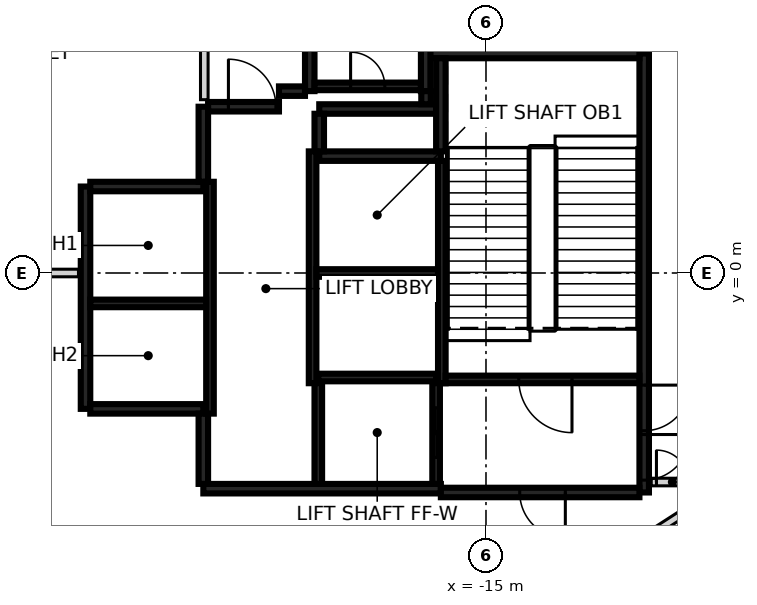
"""IFC4 building model, lengths in metres.
Left out: names, types, materials, properties, quantities, classifications, styles, units other than length and angle.
Written with IfcOpenShell. Run it as: python <this file> out.ifc"""

import sys

from ifc_helpers import new_model, si_unit, direction, frame, frame_2d, origin, place, context, subcontext, project, spatial, rectangle, extrude, element, fill, save


model = new_model("IFC4")
c1 = context("Model", 3, precision=1e-05, world=origin(), true_north=direction((0.0, 1.0)))
c2 = subcontext(c1, "Body", "Model", "MODEL_VIEW")
j1 = project(units=[si_unit("LENGTHUNIT", "METRE"), si_unit("PLANEANGLEUNIT", "RADIAN")], contexts=[c1])
p1 = place(None, origin())
s1 = spatial("IfcSite", under=j1, at=p1, CompositionType="ELEMENT")
p2 = place(p1, origin())
s2 = spatial("IfcBuilding", under=s1, at=p2, CompositionType="ELEMENT")
p3 = place(p2, frame((0.0, 0.0, 24.5)))
s3 = spatial("IfcBuildingStorey", under=s2, at=p3, CompositionType="ELEMENT", Elevation=24.5)
p4 = place(p3, frame((-10.837, 5.775, 0.0), z_axis=(0.0, 0.0, 1.0), x_axis=(0.0, -1.0, 0.0)))
e1 = element("IfcWall", 1, at=p4, inside=s3, PredefinedType="SHEAR", context=c2, shape_type="SweptSolid", body=[
    extrude(rectangle(XDim=11.55, YDim=0.25, at=frame_2d((5.775, 0.0))), origin(), (0.0, 0.0, 1.0), 4.6),
])
p5 = place(p4, frame((10.025, 0.0, 0.0)))
e2 = element("IfcOpeningElement", 2, at=p5, cuts=e1, PredefinedType="OPENING", context=c2, shape_type="SweptSolid", body=[
    extrude(rectangle(XDim=1.2, YDim=2.1, at=frame_2d((0.6, 1.05))), frame((0.0, 0.135, 0.0), z_axis=(0.0, -1.0, 0.0), x_axis=(1.0, 0.0, 0.0)), (0.0, 0.0, 1.0), 0.27),
])
p6 = place(p4, frame((8.725, 0.0, 0.0)))
e3 = element("IfcOpeningElement", 3, at=p6, cuts=e1, PredefinedType="OPENING", context=c2, shape_type="SweptSolid", body=[
    extrude(rectangle(XDim=1.2, YDim=2.1, at=frame_2d((0.6, 1.05))), frame((0.0, 0.135, 0.0), z_axis=(0.0, -1.0, 0.0), x_axis=(1.0, 0.0, 0.0)), (0.0, 0.0, 1.0), 0.27),
])
p7 = place(p3, frame((-16.187, -5.675, 0.0), z_axis=(0.0, 0.0, 1.0), x_axis=(-1.0, 0.0, 0.0)))
e4 = element("IfcWall", 4, at=p7, inside=s3, PredefinedType="SHEAR", context=c2, shape_type="SweptSolid", body=[
    extrude(rectangle(XDim=6.25, YDim=0.25, at=frame_2d((3.125, 0.0))), origin(), (0.0, 0.0, 1.0), 4.6),
])
p8 = place(p3, frame((-25.537, -3.575, 0.0), z_axis=(0.0, 0.0, 1.0), x_axis=(0.0, 1.0, 0.0)))
e5 = element("IfcWall", 5, at=p8, inside=s3, PredefinedType="SHEAR", context=c2, shape_type="SweptSolid", body=[
    extrude(rectangle(XDim=5.85, YDim=0.25, at=frame_2d((2.925, 0.0))), origin(), (0.0, 0.0, 1.0), 4.6),
])
p9 = place(p3, frame((-10.963, -5.775, 0.0), z_axis=(0.0, 0.0, 1.0), x_axis=(-1.0, 0.0, 0.0)))
e6 = element("IfcWall", 6, at=p9, inside=s3, PredefinedType="SHEAR", context=c2, shape_type="SweptSolid", body=[
    extrude(rectangle(XDim=5.225, YDim=0.25, at=frame_2d((2.612, 0.0))), origin(), (0.0, 0.0, 1.0), 4.6),
])
p10 = place(p9, frame((1.95, 0.0, 0.0)))
e7 = element("IfcOpeningElement", 7, at=p10, cuts=e6, PredefinedType="OPENING", context=c2, shape_type="SweptSolid", body=[
    extrude(rectangle(XDim=1.2, YDim=2.1, at=frame_2d((0.6, 1.05))), frame((0.0, 0.135, 0.0), z_axis=(0.0, -1.0, 0.0), x_axis=(1.0, 0.0, 0.0)), (0.0, 0.0, 1.0), 0.27),
])
p11 = place(p3, frame((-16.472, 5.775, 0.0), z_axis=(0.0, 0.0, 1.0), x_axis=(1.0, 0.0, 0.0)))
e8 = element("IfcWall", 8, at=p11, inside=s3, PredefinedType="SHEAR", context=c2, shape_type="SweptSolid", body=[
    extrude(rectangle(XDim=5.51, YDim=0.25, at=frame_2d((2.755, 0.0))), origin(), (0.0, 0.0, 1.0), 4.6),
])
p12 = place(p3, frame((-19.387, 3.075, 0.0), z_axis=(0.0, 0.0, 1.0), x_axis=(1.0, 0.0, 0.0)))
e9 = element("IfcWall", 9, at=p12, inside=s3, PredefinedType="SHEAR", context=c2, shape_type="SweptSolid", body=[
    extrude(rectangle(XDim=3.2, YDim=0.25, at=frame_2d((1.6, 0.0))), origin(), (0.0, 0.0, 1.0), 4.6),
])
for number, where, z_axis, x_axis in (
    (10, (-22.437, -3.575, 0.0), (0.0, 0.0, 1.0), (-1.0, 0.0, 0.0)),
    (11, (-25.412, 2.275, 0.0), (0.0, 0.0, 1.0), (1.0, 0.0, 0.0)),
):
    element("IfcWall", number, at=place(p3, frame(where, z_axis=z_axis, x_axis=x_axis)), inside=s3, PredefinedType="SHEAR", context=c2, shape_type="SweptSolid", body=[
        extrude(rectangle(XDim=2.975, YDim=0.25, at=frame_2d((1.487, 0.0))), origin(), (0.0, 0.0, 1.0), 4.6),
    ])
for number, where, z_axis, x_axis in (
    (12, (-16.587, 7.65, 0.0), (0.0, 0.0, 1.0), (0.0, -1.0, 0.0)),
    (13, (-19.637, 4.785, 0.0), (0.0, 0.0, 1.0), (0.0, 1.0, 0.0)),
):
    element("IfcWall", number, at=place(p3, frame(where, z_axis=z_axis, x_axis=x_axis)), inside=s3, PredefinedType="SHEAR", context=c2, shape_type="SweptSolid", body=[
        extrude(rectangle(XDim=2.865, YDim=0.25, at=frame_2d((1.432, 0.0))), origin(), (0.0, 0.0, 1.0), 4.6),
    ])
p13 = place(p3, frame((-16.302, 4.315, 0.0), z_axis=(0.0, 0.0, 1.0), x_axis=(-1.0, 0.0, 0.0)))
e14 = element("IfcWall", 14, at=p13, inside=s3, PredefinedType="SHEAR", context=c2, shape_type="SweptSolid", body=[
    extrude(rectangle(XDim=3.085, YDim=0.25, at=frame_2d((1.542, 0.0))), origin(), (0.0, 0.0, 1.0), 4.6),
])
p14 = place(p3, frame((-16.187, 3.2, 0.0), z_axis=(0.0, 0.0, 1.0), x_axis=(0.0, 1.0, 0.0)))
e15 = element("IfcWall", 15, at=p14, inside=s3, PredefinedType="SHEAR", context=c2, shape_type="SweptSolid", body=[
    extrude(rectangle(XDim=2.449, YDim=0.25, at=frame_2d((1.225, 0.0))), origin(), (0.0, 0.0, 1.0), 4.6),
])
p15 = place(p3, frame((-22.437, 2.4, 0.0), z_axis=(0.0, 0.0, 1.0), x_axis=(0.0, 1.0, 0.0)))
e16 = element("IfcWall", 16, at=p15, inside=s3, PredefinedType="SHEAR", context=c2, shape_type="SweptSolid", body=[
    extrude(rectangle(XDim=1.975, YDim=0.25, at=frame_2d((0.987, 0.0))), origin(), (0.0, 0.0, 1.0), 4.6),
])
p16 = place(p3, frame((-22.437, -5.55, 0.0), z_axis=(0.0, 0.0, 1.0), x_axis=(0.0, 1.0, 0.0)))
e17 = element("IfcWall", 17, at=p16, inside=s3, PredefinedType="SHEAR", context=c2, shape_type="SweptSolid", body=[
    extrude(rectangle(XDim=1.849, YDim=0.25, at=frame_2d((0.925, 0.0))), origin(), (0.0, 0.0, 1.0), 4.6),
])
p17 = place(p3, frame((-22.312, 4.375, 0.0), z_axis=(0.0, 0.0, 1.0), x_axis=(1.0, 0.0, 0.0)))
e18 = element("IfcWall", 18, at=p17, inside=s3, PredefinedType="SHEAR", context=c2, shape_type="SweptSolid", body=[
    extrude(rectangle(XDim=1.865, YDim=0.25, at=frame_2d((0.932, 0.0))), origin(), (0.0, 0.0, 1.0), 4.6),
])
p18 = place(p17, frame((0.535, 0.0, 0.0)))
e19 = element("IfcOpeningElement", 19, at=p18, cuts=e18, PredefinedType="OPENING", context=c2, shape_type="SweptSolid", body=[
    extrude(rectangle(XDim=1.25, YDim=2.1, at=frame_2d((0.625, 1.05))), frame((0.0, 0.135, 0.0), z_axis=(0.0, -1.0, 0.0), x_axis=(1.0, 0.0, 0.0)), (0.0, 0.0, 1.0), 0.27),
])
p19 = place(p3, frame((-19.387, 4.19, 0.0), z_axis=(0.0, 0.0, 1.0), x_axis=(0.0, -1.0, 0.0)))
e20 = element("IfcWall", 20, at=p19, inside=s3, PredefinedType="SHEAR", context=c2, shape_type="SweptSolid", body=[
    extrude(rectangle(XDim=0.989, YDim=0.25, at=frame_2d((0.495, 0.0))), origin(), (0.0, 0.0, 1.0), 4.6),
])
p20 = place(p3, frame((-20.447, 4.785, 0.0), z_axis=(0.0, 0.0, 1.0), x_axis=(1.0, 0.0, 0.0)))
e21 = element("IfcWall", 21, at=p20, inside=s3, PredefinedType="SHEAR", context=c2, shape_type="SweptSolid", body=[
    extrude(rectangle(XDim=0.685, YDim=0.25, at=frame_2d((0.342, 0.0))), origin(), (0.0, 0.0, 1.0), 4.6),
])
p21 = place(p3, frame((-16.577, 4.785, 0.0), z_axis=(0.0, 0.0, 1.0), x_axis=(0.0, -1.0, 0.0)))
e22 = element("IfcWall", 22, at=p21, inside=s3, PredefinedType="SHEAR", context=c2, shape_type="SweptSolid", body=[
    extrude(rectangle(XDim=0.344, YDim=0.25, at=frame_2d((0.172, 0.0))), origin(), (0.0, 0.0, 1.0), 4.6),
])
p22 = place(p3, frame((-16.162, 2.951, 0.0), z_axis=(0.0, 0.0, 1.0), x_axis=(0.0, -1.0, 0.0)))
e23 = element("IfcWall", 23, at=p22, inside=s3, PredefinedType="SHEAR", context=c2, shape_type="SweptSolid", body=[
    extrude(rectangle(XDim=5.851, YDim=0.2, at=frame_2d((2.925, 0.0))), origin(), (0.0, 0.0, 1.0), 4.6),
])
for number, where, z_axis, x_axis in (
    (24, (-19.562, -2.9, 0.0), (0.0, 0.0, 1.0), (0.0, 1.0, 0.0)),
    (25, (-22.262, 2.4, 0.0), (0.0, 0.0, 1.0), (0.0, -1.0, 0.0)),
):
    element("IfcWall", number, at=place(p3, frame(where, z_axis=z_axis, x_axis=x_axis)), inside=s3, PredefinedType="SHEAR", context=c2, shape_type="SweptSolid", body=[
        extrude(rectangle(XDim=6.1, YDim=0.2, at=frame_2d((3.05, 0.0))), origin(), (0.0, 0.0, 1.0), 4.6),
    ])
p23 = place(p3, frame((-10.963, -2.8, 0.0), z_axis=(0.0, 0.0, 1.0), x_axis=(-1.0, 0.0, 0.0)))
e26 = element("IfcWall", 26, at=p23, inside=s3, PredefinedType="SHEAR", context=c2, shape_type="SweptSolid", body=[
    extrude(rectangle(XDim=5.098, YDim=0.2, at=frame_2d((2.549, 0.0))), origin(), (0.0, 0.0, 1.0), 4.6),
])
p24 = place(p23, frame((1.774, 0.0, 0.0)))
e27 = element("IfcOpeningElement", 27, at=p24, cuts=e26, PredefinedType="OPENING", context=c2, shape_type="SweptSolid", body=[
    extrude(rectangle(XDim=1.4, YDim=2.1, at=frame_2d((0.7, 1.05))), frame((0.0, 0.11, 0.0), z_axis=(0.0, -1.0, 0.0), x_axis=(1.0, 0.0, 0.0)), (0.0, 0.0, 1.0), 0.22),
])
p25 = place(p3, frame((-16.263, 0.0, 0.0), z_axis=(0.0, 0.0, 1.0), x_axis=(-1.0, 0.0, 0.0)))
e28 = element("IfcWall", 28, at=p25, inside=s3, PredefinedType="SHEAR", context=c2, shape_type="SweptSolid", body=[
    extrude(rectangle(XDim=3.198, YDim=0.2, at=frame_2d((1.599, 0.0))), origin(), (0.0, 0.0, 1.0), 4.6),
])
p26 = place(p3, frame((-22.363, -0.8, 0.0), z_axis=(0.0, 0.0, 1.0), x_axis=(-1.0, 0.0, 0.0)))
e29 = element("IfcWall", 29, at=p26, inside=s3, PredefinedType="SHEAR", context=c2, shape_type="SweptSolid", body=[
    extrude(rectangle(XDim=3.048, YDim=0.2, at=frame_2d((1.524, 0.0))), origin(), (0.0, 0.0, 1.0), 4.6),
])
p27 = place(p3, frame((-19.511, 4.91, 0.0), z_axis=(0.0, 0.0, 1.0), x_axis=(1.0, 0.0, 0.0)))
e30 = element("IfcWall", 30, at=p27, inside=s3, PredefinedType="SHEAR", context=c2, shape_type="SweptSolid", body=[
    extrude(rectangle(XDim=2.798, YDim=0.2, at=frame_2d((1.399, 0.0))), origin(), (0.0, 0.0, 1.0), 4.6),
])
p28 = place(p27, frame((0.949, 0.0, 0.0)))
e31 = element("IfcOpeningElement", 31, at=p28, cuts=e30, PredefinedType="OPENING", context=c2, shape_type="SweptSolid", body=[
    extrude(rectangle(XDim=0.9, YDim=2.1, at=frame_2d((0.45, 1.05))), frame((0.0, 0.11, 0.0), z_axis=(0.0, -1.0, 0.0), x_axis=(1.0, 0.0, 0.0)), (0.0, 0.0, 1.0), 0.22),
])
p29 = place(p3, frame((-19.412, -2.75, 0.0), z_axis=(0.0, 0.0, 1.0), x_axis=(1.0, 0.0, 0.0)))
e32 = element("IfcWall", 32, at=p29, inside=s3, PredefinedType="SHEAR", context=c2, shape_type="SweptSolid", body=[
    extrude(rectangle(XDim=3.1, YDim=0.2, at=frame_2d((1.55, 0.0))), origin(), (0.0, 0.0, 1.0), 4.6),
])
p30 = place(p3, frame((-16.312, -2.898, 0.0), z_axis=(0.0, 0.0, 1.0), x_axis=(0.0, -1.0, 0.0)))
e33 = element("IfcWall", 33, at=p30, inside=s3, PredefinedType="SHEAR", context=c2, shape_type="SweptSolid", body=[
    extrude(rectangle(XDim=2.651, YDim=0.2, at=frame_2d((1.325, 0.0))), origin(), (0.0, 0.0, 1.0), 4.6),
])
p31 = place(p30, frame((0.652, 0.0, 0.0)))
e34 = element("IfcOpeningElement", 34, at=p31, cuts=e33, PredefinedType="OPENING", context=c2, shape_type="SweptSolid", body=[
    extrude(rectangle(XDim=1.3, YDim=2.1, at=frame_2d((0.65, 1.05))), frame((0.0, 0.11, 0.0), z_axis=(0.0, -1.0, 0.0), x_axis=(1.0, 0.0, 0.0)), (0.0, 0.0, 1.0), 0.22),
])
p32 = place(p3, frame((-19.412, -5.549, 0.0), z_axis=(0.0, 0.0, 1.0), x_axis=(0.0, 1.0, 0.0)))
e35 = element("IfcWall", 35, at=p32, inside=s3, PredefinedType="SHEAR", context=c2, shape_type="SweptSolid", body=[
    extrude(rectangle(XDim=2.651, YDim=0.2, at=frame_2d((1.325, 0.0))), origin(), (0.0, 0.0, 1.0), 4.6),
])
p33 = place(p3, frame((-22.412, 4.56, 0.0), z_axis=(0.0, 0.0, 1.0), x_axis=(0.0, 1.0, 0.0)))
e36 = element("IfcWall", 36, at=p33, inside=s3, PredefinedType="PARTITIONING", context=c2, shape_type="SweptSolid", body=[
    extrude(rectangle(XDim=1.39, YDim=0.2, at=frame_2d((0.695, 0.0))), origin(), (0.0, 0.0, 1.0), 4.6),
])
p34 = place(p3, frame((-10.652, -5.5, 0.0), z_axis=(0.0, 0.0, 1.0), x_axis=(1.0, 0.0, 0.0)))
e37 = element("IfcWall", 37, at=p34, inside=s3, PredefinedType="PARTITIONING", context=c2, shape_type="SweptSolid", body=[
    extrude(rectangle(XDim=1.177, YDim=0.2, at=frame_2d((0.589, 0.0))), origin(), (0.0, 0.0, 1.0), 4.6),
])
p35 = place(p34, frame((0.137, 0.0, 0.0)))
e38 = element("IfcOpeningElement", 38, at=p35, cuts=e37, PredefinedType="OPENING", context=c2, shape_type="SweptSolid", body=[
    extrude(rectangle(XDim=0.84, YDim=2.1, at=frame_2d((0.42, 1.05))), frame((0.0, 0.11, 0.0), z_axis=(0.0, -1.0, 0.0), x_axis=(1.0, 0.0, 0.0)), (0.0, 0.0, 1.0), 0.22),
])
p36 = place(p3, frame((-30.75, 0.0, 0.0), z_axis=(0.0, 0.0, 1.0), x_axis=(1.0, 0.0, 0.0)))
e39 = element("IfcWall", 39, at=p36, inside=s3, PredefinedType="PARTITIONING", context=c2, shape_type="SweptSolid", body=[
    extrude(rectangle(XDim=5.028, YDim=0.2, at=frame_2d((2.514, 0.0))), origin(), (0.0, 0.0, 1.0), 4.6),
])
p37 = place(p3, frame((-25.509, -16.444, 0.0), z_axis=(0.0, 0.0, 1.0), x_axis=(0.840502189504, 0.541808148184, 0.0)))
e40 = element("IfcWall", 40, at=p37, inside=s3, PredefinedType="PARTITIONING", context=c2, shape_type="SweptSolid", body=[
    extrude(rectangle(XDim=19.666, YDim=0.2, at=frame_2d((9.833, 0.0))), origin(), (0.0, 0.0, 1.0), 4.6),
])
p38 = place(p31, origin())
e41 = element("IfcDoor", 41, at=p38, inside=s3, OperationType="SLIDING_TO_LEFT", PredefinedType="DOOR", context=c2, shape_type="SweptSolid", body=[
    extrude(rectangle(XDim=1.3, YDim=2.1, at=frame_2d((0.65, 1.05))), frame((0.0, 0.025, 0.0), z_axis=(0.0, -1.0, 0.0), x_axis=(1.0, 0.0, 0.0)), (0.0, 0.0, 1.0), 0.05),
])
fill(e34, e41)
p39 = place(p18, origin())
e42 = element("IfcDoor", 42, at=p39, inside=s3, OperationType="SINGLE_SWING_LEFT", PredefinedType="DOOR", context=c2, shape_type="SweptSolid", body=[
    extrude(rectangle(XDim=1.25, YDim=2.1, at=frame_2d((0.625, 1.05))), frame((0.0, 0.025, 0.0), z_axis=(0.0, -1.0, 0.0), x_axis=(1.0, 0.0, 0.0)), (0.0, 0.0, 1.0), 0.05),
])
fill(e19, e42)
p40 = place(p5, origin())
e43 = element("IfcDoor", 43, at=p40, inside=s3, OperationType="SINGLE_SWING_LEFT", PredefinedType="DOOR", context=c2, shape_type="SweptSolid", body=[
    extrude(rectangle(XDim=1.2, YDim=2.1, at=frame_2d((0.6, 1.05))), frame((0.0, 0.025, 0.0), z_axis=(0.0, -1.0, 0.0), x_axis=(1.0, 0.0, 0.0)), (0.0, 0.0, 1.0), 0.05),
])
fill(e2, e43)
p41 = place(p6, origin())
e44 = element("IfcDoor", 44, at=p41, inside=s3, OperationType="SINGLE_SWING_RIGHT", PredefinedType="DOOR", context=c2, shape_type="SweptSolid", body=[
    extrude(rectangle(XDim=1.2, YDim=2.1, at=frame_2d((0.6, 1.05))), frame((0.0, 0.025, 0.0), z_axis=(0.0, -1.0, 0.0), x_axis=(1.0, 0.0, 0.0)), (0.0, 0.0, 1.0), 0.05),
])
fill(e3, e44)
p42 = place(p24, origin())
e45 = element("IfcDoor", 45, at=p42, inside=s3, OperationType="SINGLE_SWING_LEFT", PredefinedType="DOOR", context=c2, shape_type="SweptSolid", body=[
    extrude(rectangle(XDim=1.4, YDim=2.1, at=frame_2d((0.7, 1.05))), frame((0.0, 0.025, 0.0), z_axis=(0.0, -1.0, 0.0), x_axis=(1.0, 0.0, 0.0)), (0.0, 0.0, 1.0), 0.05),
])
fill(e27, e45)
p43 = place(p28, origin())
e46 = element("IfcDoor", 46, at=p43, inside=s3, OperationType="SINGLE_SWING_RIGHT", PredefinedType="DOOR", context=c2, shape_type="SweptSolid", body=[
    extrude(rectangle(XDim=0.9, YDim=2.1, at=frame_2d((0.45, 1.05))), frame((0.0, 0.025, 0.0), z_axis=(0.0, -1.0, 0.0), x_axis=(1.0, 0.0, 0.0)), (0.0, 0.0, 1.0), 0.05),
])
fill(e31, e46)
p44 = place(p10, origin())
e47 = element("IfcDoor", 47, at=p44, inside=s3, OperationType="SINGLE_SWING_RIGHT", PredefinedType="DOOR", context=c2, shape_type="SweptSolid", body=[
    extrude(rectangle(XDim=1.2, YDim=2.1, at=frame_2d((0.6, 1.05))), frame((0.0, 0.025, 0.0), z_axis=(0.0, -1.0, 0.0), x_axis=(1.0, 0.0, 0.0)), (0.0, 0.0, 1.0), 0.05),
])
fill(e7, e47)
p45 = place(p35, origin())
e48 = element("IfcDoor", 48, at=p45, inside=s3, OperationType="SINGLE_SWING_LEFT", PredefinedType="DOOR", context=c2, shape_type="SweptSolid", body=[
    extrude(rectangle(XDim=0.84, YDim=2.1, at=frame_2d((0.42, 1.05))), frame((0.0, 0.025, 0.0), z_axis=(0.0, -1.0, 0.0), x_axis=(1.0, 0.0, 0.0)), (0.0, 0.0, 1.0), 0.05),
])
fill(e38, e48)
save(model, sys.argv[1])
